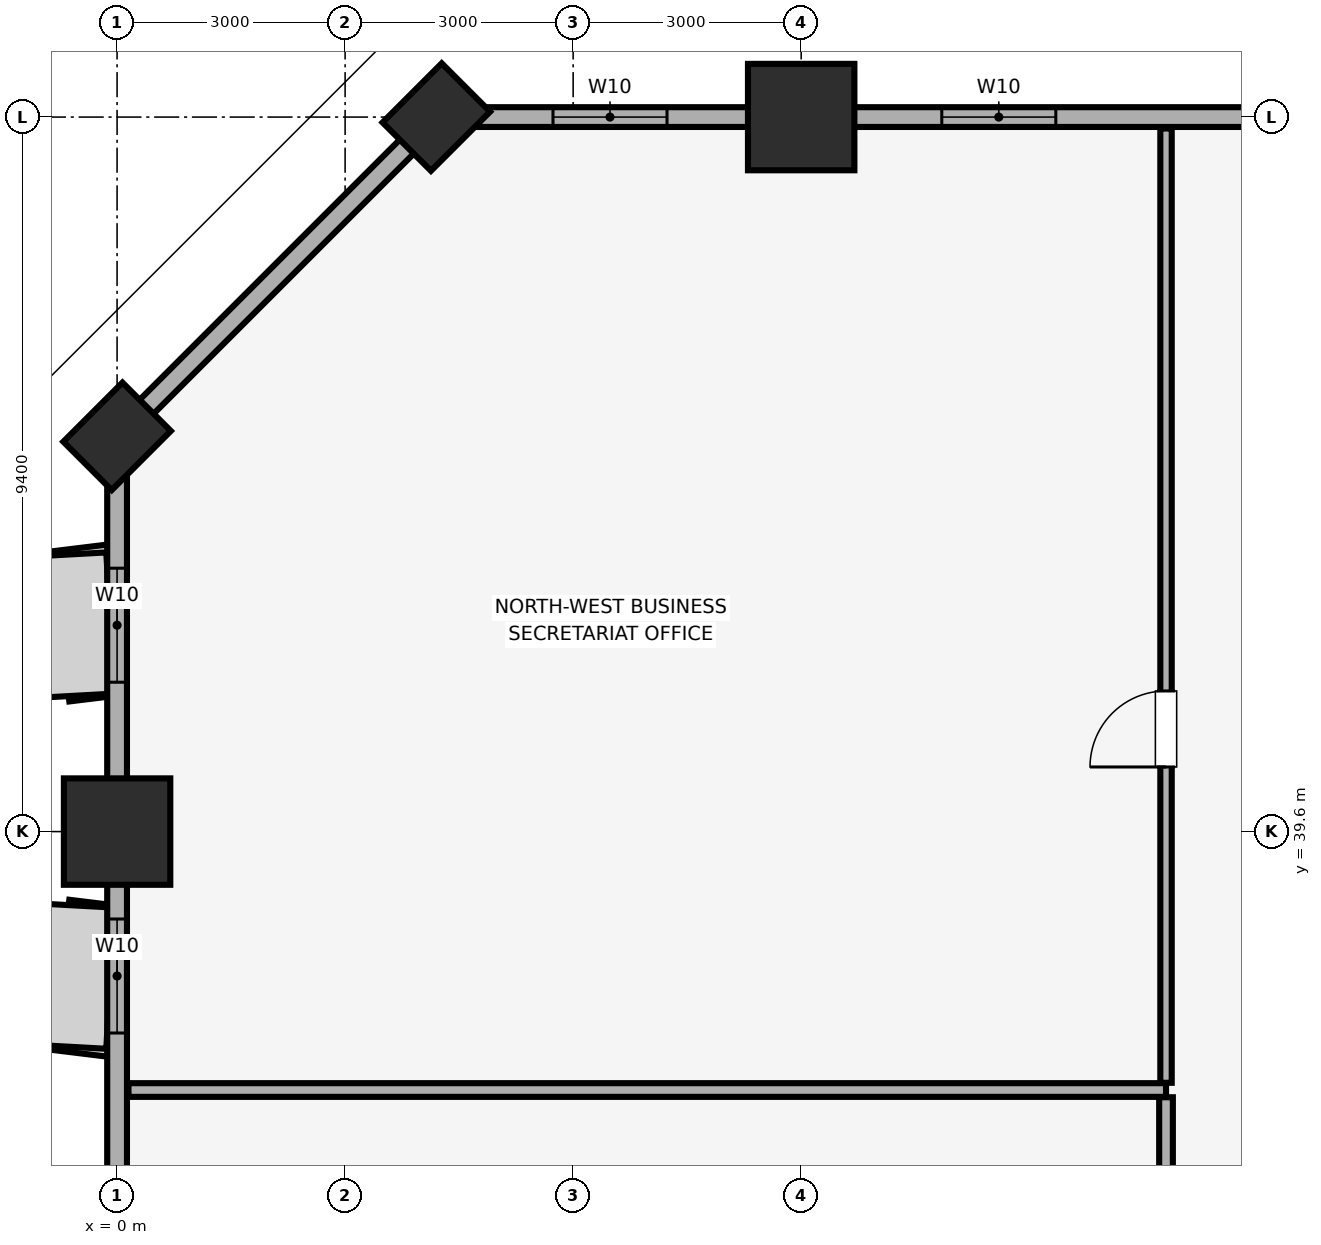
"""IFC4 building model, lengths in metres.
Left out: names, types, materials, properties, quantities, classifications, styles, units other than length and angle.
Written with IfcOpenShell. Run it as: python <this file> out.ifc"""

import sys

from ifc_helpers import new_model, si_unit, direction, frame, frame_2d, origin, origin_2d, place, context, subcontext, project, spatial, rectangle, extrude, element, fill, save


model = new_model("IFC4")
c1 = context("Model", 3, precision=1e-05, world=origin(), true_north=direction((0.0, 1.0)))
c2 = subcontext(c1, "Body", "Model", "MODEL_VIEW")
j1 = project(units=[si_unit("LENGTHUNIT", "METRE"), si_unit("PLANEANGLEUNIT", "RADIAN")], contexts=[c1])
p1 = place(None, origin())
s1 = spatial("IfcSite", under=j1, at=p1, CompositionType="ELEMENT")
p2 = place(p1, origin())
s2 = spatial("IfcBuilding", under=s1, at=p2, CompositionType="ELEMENT")
p3 = place(p2, frame((0.0, 0.0, 35.15)))
s3 = spatial("IfcBuildingStorey", under=s2, at=p3, CompositionType="ELEMENT", Elevation=35.15)
p4 = place(p3, frame((0.0, 39.6, 0.0), z_axis=(0.0, 0.0, 1.0), x_axis=(1.0, 0.0, 0.0)))
e1 = element("IfcColumn", 1, at=p4, inside=s3, PredefinedType="COLUMN", context=c2, shape_type="SweptSolid", body=[
    extrude(rectangle(XDim=1.4, YDim=1.4, at=origin_2d()), origin(), (0.0, 0.0, 1.0), 3.51),
])
for number, where, z_axis, x_axis in (
    (2, (4.2, 49.0, 0.0), (0.0, 0.0, 1.0), (0.707, 0.707, 0.0)),
    (3, (0.0, 44.8, 0.0), (0.0, 0.0, 1.0), (0.707, 0.707, 0.0)),
):
    element("IfcColumn", number, at=place(p3, frame(where, z_axis=z_axis, x_axis=x_axis)), inside=s3, PredefinedType="PILASTER", context=c2, shape_type="SweptSolid", body=[
        extrude(rectangle(XDim=1.1, YDim=0.9, at=origin_2d()), origin(), (0.0, 0.0, 1.0), 3.51),
    ])
p5 = place(p3, frame((9.0, 49.0, 0.0), z_axis=(0.0, 0.0, 1.0), x_axis=(1.0, 0.0, 0.0)))
e4 = element("IfcColumn", 4, at=p5, inside=s3, PredefinedType="COLUMN", context=c2, shape_type="SweptSolid", body=[
    extrude(rectangle(XDim=1.4, YDim=1.4, at=origin_2d()), origin(), (0.0, 0.0, 1.0), 3.51),
])
p6 = place(p3, frame((79.8, 49.0, 0.0), z_axis=(0.0, 0.0, 1.0), x_axis=(-1.0, 0.0, 0.0)))
e5 = element("IfcWall", 5, at=p6, inside=s3, PredefinedType="SOLIDWALL", context=c2, shape_type="SweptSolid", body=[
    extrude(rectangle(XDim=75.6, YDim=0.26, at=frame_2d((37.8, 0.0))), origin(), (0.0, 0.0, 1.0), 2.56),
])
p7 = place(p6, frame((72.565, 0.0, 0.85)))
e6 = element("IfcOpeningElement", 6, at=p7, cuts=e5, PredefinedType="OPENING", context=c2, shape_type="SweptSolid", body=[
    extrude(rectangle(XDim=1.5, YDim=1.4, at=frame_2d((0.75, 0.7))), frame((0.0, 0.14, 0.0), z_axis=(0.0, -1.0, 0.0), x_axis=(1.0, 0.0, 0.0)), (0.0, 0.0, 1.0), 0.28),
])
p8 = place(p6, frame((67.45, 0.0, 0.85)))
e7 = element("IfcOpeningElement", 7, at=p8, cuts=e5, PredefinedType="OPENING", context=c2, shape_type="SweptSolid", body=[
    extrude(rectangle(XDim=1.5, YDim=1.4, at=frame_2d((0.75, 0.7))), frame((0.0, 0.14, 0.0), z_axis=(0.0, -1.0, 0.0), x_axis=(1.0, 0.0, 0.0)), (0.0, 0.0, 1.0), 0.28),
])
p9 = place(p6, frame((6.65, 0.0, 0.85)))
e8 = element("IfcOpeningElement", 8, at=p9, cuts=e5, PredefinedType="OPENING", context=c2, shape_type="SweptSolid", body=[
    extrude(rectangle(XDim=1.5, YDim=1.4, at=frame_2d((0.75, 0.7))), frame((0.0, 0.14, 0.0), z_axis=(0.0, -1.0, 0.0), x_axis=(1.0, 0.0, 0.0)), (0.0, 0.0, 1.0), 0.28),
])
p10 = place(p6, frame((1.535, 0.0, 0.85)))
e9 = element("IfcOpeningElement", 9, at=p10, cuts=e5, PredefinedType="OPENING", context=c2, shape_type="SweptSolid", body=[
    extrude(rectangle(XDim=1.5, YDim=1.4, at=frame_2d((0.75, 0.7))), frame((0.0, 0.14, 0.0), z_axis=(0.0, -1.0, 0.0), x_axis=(1.0, 0.0, 0.0)), (0.0, 0.0, 1.0), 0.28),
])
p11 = place(p6, frame((51.365, 0.0, 0.9)))
e10 = element("IfcOpeningElement", 10, at=p11, cuts=e5, PredefinedType="OPENING", context=c2, shape_type="SweptSolid", body=[
    extrude(rectangle(XDim=1.5, YDim=1.4, at=frame_2d((0.75, 0.7))), frame((0.0, 0.14, 0.0), z_axis=(0.0, -1.0, 0.0), x_axis=(1.0, 0.0, 0.0)), (0.0, 0.0, 1.0), 0.28),
])
p12 = place(p6, frame((46.0, 0.0, 0.9)))
e11 = element("IfcOpeningElement", 11, at=p12, cuts=e5, PredefinedType="OPENING", context=c2, shape_type="SweptSolid", body=[
    extrude(rectangle(XDim=1.5, YDim=1.4, at=frame_2d((0.75, 0.7))), frame((0.0, 0.14, 0.0), z_axis=(0.0, -1.0, 0.0), x_axis=(1.0, 0.0, 0.0)), (0.0, 0.0, 1.0), 0.28),
])
p13 = place(p6, frame((29.15, 0.0, 0.9)))
e12 = element("IfcOpeningElement", 12, at=p13, cuts=e5, PredefinedType="OPENING", context=c2, shape_type="SweptSolid", body=[
    extrude(rectangle(XDim=1.5, YDim=1.4, at=frame_2d((0.75, 0.7))), frame((0.0, 0.14, 0.0), z_axis=(0.0, -1.0, 0.0), x_axis=(1.0, 0.0, 0.0)), (0.0, 0.0, 1.0), 0.28),
])
p14 = place(p6, frame((23.485, 0.0, 0.9)))
e13 = element("IfcOpeningElement", 13, at=p14, cuts=e5, PredefinedType="OPENING", context=c2, shape_type="SweptSolid", body=[
    extrude(rectangle(XDim=1.5, YDim=1.4, at=frame_2d((0.75, 0.7))), frame((0.0, 0.14, 0.0), z_axis=(0.0, -1.0, 0.0), x_axis=(1.0, 0.0, 0.0)), (0.0, 0.0, 1.0), 0.28),
])
p15 = place(p3, frame((4.2, 49.0, 0.0), z_axis=(0.0, 0.0, 1.0), x_axis=(-0.707106781187, -0.707106781187, 0.0)))
e14 = element("IfcWall", 14, at=p15, inside=s3, PredefinedType="SOLIDWALL", context=c2, shape_type="SweptSolid", body=[
    extrude(rectangle(XDim=5.94, YDim=0.26, at=frame_2d((2.97, 0.0))), origin(), (0.0, 0.0, 1.0), 2.56),
])
p16 = place(p3, frame((0.0, 44.8, 0.0), z_axis=(0.0, 0.0, 1.0), x_axis=(0.0, -1.0, 0.0)))
e15 = element("IfcWall", 15, at=p16, inside=s3, PredefinedType="SOLIDWALL", context=c2, shape_type="SweptSolid", body=[
    extrude(rectangle(XDim=40.6, YDim=0.26, at=frame_2d((20.3, 0.0))), origin(), (0.0, 0.0, 1.0), 2.56),
])
p17 = place(p16, frame((31.425, 0.0, 0.85)))
e16 = element("IfcOpeningElement", 16, at=p17, cuts=e15, PredefinedType="OPENING", context=c2, shape_type="SweptSolid", body=[
    extrude(rectangle(XDim=1.5, YDim=1.4, at=frame_2d((0.75, 0.7))), frame((0.0, 0.14, 0.0), z_axis=(0.0, -1.0, 0.0), x_axis=(1.0, 0.0, 0.0)), (0.0, 0.0, 1.0), 0.28),
])
p18 = place(p16, frame((26.34, 0.0, 0.85)))
e17 = element("IfcOpeningElement", 17, at=p18, cuts=e15, PredefinedType="OPENING", context=c2, shape_type="SweptSolid", body=[
    extrude(rectangle(XDim=1.5, YDim=1.4, at=frame_2d((0.75, 0.7))), frame((0.0, 0.14, 0.0), z_axis=(0.0, -1.0, 0.0), x_axis=(1.0, 0.0, 0.0)), (0.0, 0.0, 1.0), 0.28),
])
p19 = place(p16, frame((19.54, 0.0, 0.85)))
e18 = element("IfcOpeningElement", 18, at=p19, cuts=e15, PredefinedType="OPENING", context=c2, shape_type="SweptSolid", body=[
    extrude(rectangle(XDim=1.5, YDim=1.4, at=frame_2d((0.75, 0.7))), frame((0.0, 0.14, 0.0), z_axis=(0.0, -1.0, 0.0), x_axis=(1.0, 0.0, 0.0)), (0.0, 0.0, 1.0), 0.28),
])
p20 = place(p16, frame((11.05, 0.0, 0.85)))
e19 = element("IfcOpeningElement", 19, at=p20, cuts=e15, PredefinedType="OPENING", context=c2, shape_type="SweptSolid", body=[
    extrude(rectangle(XDim=1.5, YDim=1.4, at=frame_2d((0.75, 0.7))), frame((0.0, 0.14, 0.0), z_axis=(0.0, -1.0, 0.0), x_axis=(1.0, 0.0, 0.0)), (0.0, 0.0, 1.0), 0.28),
])
p21 = place(p16, frame((6.35, 0.0, 0.85)))
e20 = element("IfcOpeningElement", 20, at=p21, cuts=e15, PredefinedType="OPENING", context=c2, shape_type="SweptSolid", body=[
    extrude(rectangle(XDim=1.5, YDim=1.4, at=frame_2d((0.75, 0.7))), frame((0.0, 0.14, 0.0), z_axis=(0.0, -1.0, 0.0), x_axis=(1.0, 0.0, 0.0)), (0.0, 0.0, 1.0), 0.28),
])
p22 = place(p16, frame((1.735, 0.0, 0.85)))
e21 = element("IfcOpeningElement", 21, at=p22, cuts=e15, PredefinedType="OPENING", context=c2, shape_type="SweptSolid", body=[
    extrude(rectangle(XDim=1.5, YDim=1.4, at=frame_2d((0.75, 0.7))), frame((0.0, 0.14, 0.0), z_axis=(0.0, -1.0, 0.0), x_axis=(1.0, 0.0, 0.0)), (0.0, 0.0, 1.0), 0.28),
])
p23 = place(p3, frame((0.15, 36.2, 0.0), z_axis=(0.0, 0.0, 1.0), x_axis=(1.0, 0.0, 0.0)))
e22 = element("IfcWall", 22, at=p23, inside=s3, PredefinedType="PARTITIONING", context=c2, shape_type="SweptSolid", body=[
    extrude(rectangle(XDim=13.65, YDim=0.18, at=frame_2d((6.825, 0.0))), origin(), (0.0, 0.0, 1.0), 3.51),
])
p24 = place(p3, frame((13.8, 29.495, 0.0), z_axis=(0.0, 0.0, 1.0), x_axis=(0.0, 1.0, 0.0)))
e23 = element("IfcWall", 23, at=p24, inside=s3, PredefinedType="PARTITIONING", context=c2, shape_type="SweptSolid", body=[
    extrude(rectangle(XDim=6.61, YDim=0.18, at=frame_2d((3.305, 0.0))), origin(), (0.0, 0.0, 1.0), 3.51),
])
p25 = place(p24, frame((4.28, 0.0, 0.0)))
e24 = element("IfcOpeningElement", 24, at=p25, cuts=e23, PredefinedType="OPENING", context=c2, shape_type="SweptSolid", body=[
    extrude(rectangle(XDim=1.0, YDim=2.15, at=frame_2d((0.5, 1.075))), frame((0.0, 0.1, 0.0), z_axis=(0.0, -1.0, 0.0), x_axis=(1.0, 0.0, 0.0)), (0.0, 0.0, 1.0), 0.2),
])
p26 = place(p3, frame((13.8, 36.295, 0.0), z_axis=(0.0, 0.0, 1.0), x_axis=(0.0, 1.0, 0.0)))
e25 = element("IfcWall", 25, at=p26, inside=s3, PredefinedType="PARTITIONING", context=c2, shape_type="SweptSolid", body=[
    extrude(rectangle(XDim=12.555, YDim=0.15, at=frame_2d((6.278, 0.0))), origin(), (0.0, 0.0, 1.0), 3.51),
])
p27 = place(p26, frame((4.155, 0.0, 0.0)))
e26 = element("IfcOpeningElement", 26, at=p27, cuts=e25, PredefinedType="OPENING", context=c2, shape_type="SweptSolid", body=[
    extrude(rectangle(XDim=1.0, YDim=2.15, at=frame_2d((0.5, 1.075))), frame((0.0, 0.085, 0.0), z_axis=(0.0, -1.0, 0.0), x_axis=(1.0, 0.0, 0.0)), (0.0, 0.0, 1.0), 0.17),
])
p28 = place(p21, origin())
e27 = element("IfcWindow", 27, at=p28, inside=s3, PartitioningType="SINGLE_PANEL", PredefinedType="WINDOW", context=c2, shape_type="SweptSolid", body=[
    extrude(rectangle(XDim=1.5, YDim=1.4, at=frame_2d((0.75, 0.7))), frame((0.0, 0.03, 0.0), z_axis=(0.0, -1.0, 0.0), x_axis=(1.0, 0.0, 0.0)), (0.0, 0.0, 1.0), 0.06),
])
fill(e20, e27)
p29 = place(p22, origin())
e28 = element("IfcWindow", 28, at=p29, inside=s3, PartitioningType="SINGLE_PANEL", PredefinedType="WINDOW", context=c2, shape_type="SweptSolid", body=[
    extrude(rectangle(XDim=1.5, YDim=1.4, at=frame_2d((0.75, 0.7))), frame((0.0, 0.03, 0.0), z_axis=(0.0, -1.0, 0.0), x_axis=(1.0, 0.0, 0.0)), (0.0, 0.0, 1.0), 0.06),
])
fill(e21, e28)
p30 = place(p7, origin())
e29 = element("IfcWindow", 29, at=p30, inside=s3, PartitioningType="SINGLE_PANEL", PredefinedType="WINDOW", context=c2, shape_type="SweptSolid", body=[
    extrude(rectangle(XDim=1.5, YDim=1.4, at=frame_2d((0.75, 0.7))), frame((0.0, 0.03, 0.0), z_axis=(0.0, -1.0, 0.0), x_axis=(1.0, 0.0, 0.0)), (0.0, 0.0, 1.0), 0.06),
])
fill(e6, e29)
p31 = place(p8, origin())
e30 = element("IfcWindow", 30, at=p31, inside=s3, PartitioningType="SINGLE_PANEL", PredefinedType="WINDOW", context=c2, shape_type="SweptSolid", body=[
    extrude(rectangle(XDim=1.5, YDim=1.4, at=frame_2d((0.75, 0.7))), frame((0.0, 0.03, 0.0), z_axis=(0.0, -1.0, 0.0), x_axis=(1.0, 0.0, 0.0)), (0.0, 0.0, 1.0), 0.06),
])
fill(e7, e30)
p32 = place(p27, origin())
e31 = element("IfcDoor", 31, at=p32, inside=s3, OperationType="SINGLE_SWING_LEFT", PredefinedType="DOOR", context=c2, shape_type="SweptSolid", body=[
    extrude(rectangle(XDim=1.0, YDim=2.15, at=frame_2d((0.5, 1.075))), frame((0.0, 0.025, 0.0), z_axis=(0.0, -1.0, 0.0), x_axis=(1.0, 0.0, 0.0)), (0.0, 0.0, 1.0), 0.05),
])
fill(e26, e31)
save(model, sys.argv[1])
